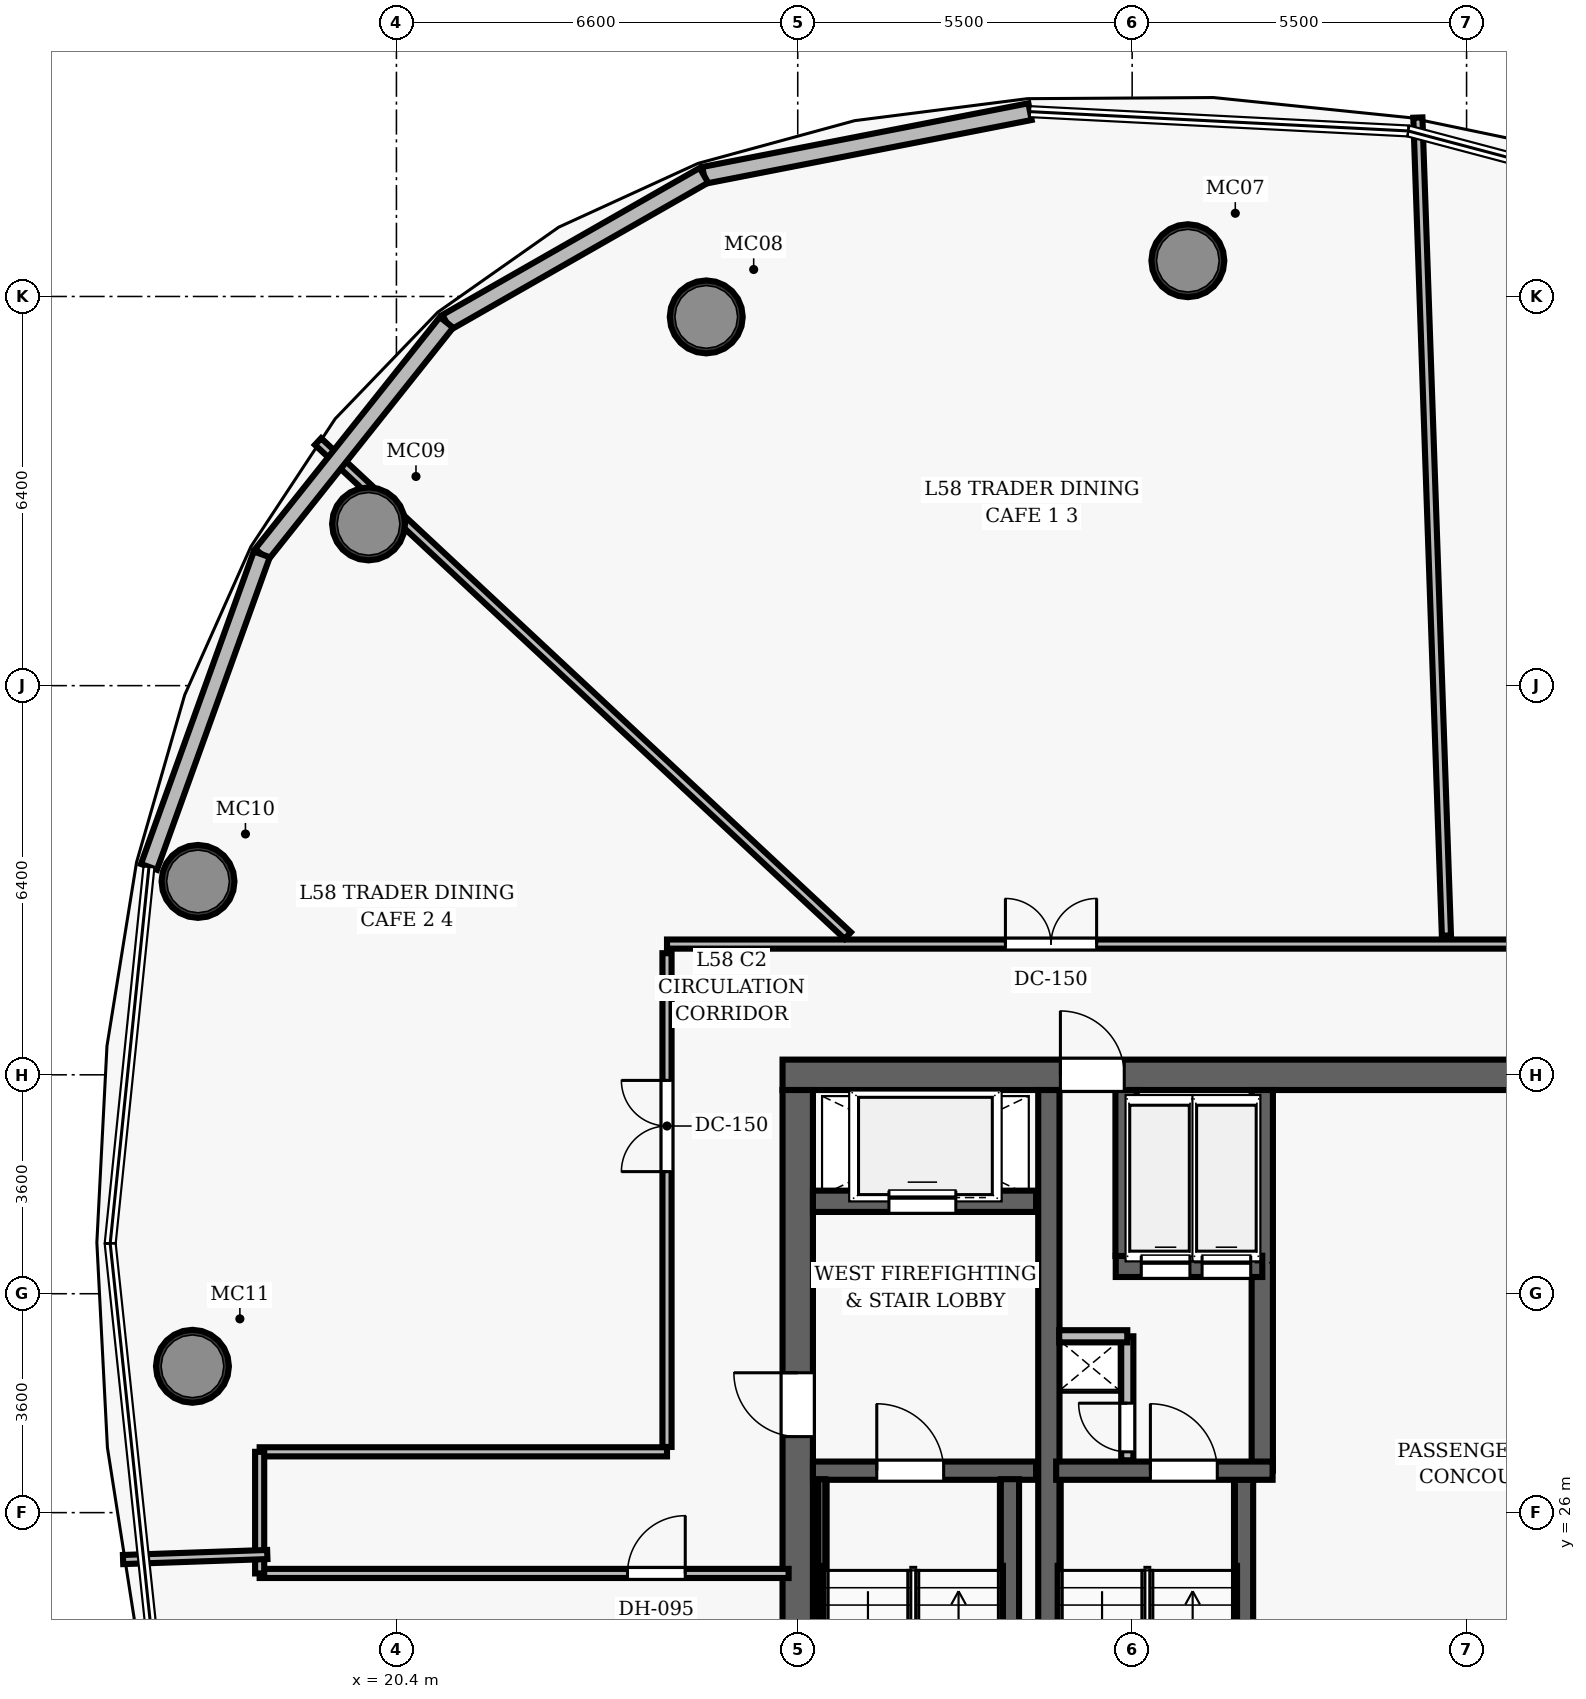
"""IFC4 building model, lengths in metres.
Left out: names, types, materials, properties, quantities, classifications, styles, units other than length and angle.
Written with IfcOpenShell. Run it as: python <this file> out.ifc"""

import sys

from ifc_helpers import new_model, si_unit, direction, frame, frame_2d, origin, origin_2d, place, context, subcontext, project, spatial, rectangle, hollow_circle, extrude, element, fill, save


model = new_model("IFC4")
c1 = context("Model", 3, precision=1e-05, world=origin(), true_north=direction((0.0, 1.0)))
c2 = subcontext(c1, "Body", "Model", "MODEL_VIEW")
j1 = project(units=[si_unit("LENGTHUNIT", "METRE"), si_unit("PLANEANGLEUNIT", "RADIAN")], contexts=[c1])
p1 = place(None, origin())
s1 = spatial("IfcSite", under=j1, at=p1, CompositionType="ELEMENT")
p2 = place(p1, origin())
s2 = spatial("IfcBuilding", under=s1, at=p2, CompositionType="ELEMENT")
p3 = place(p2, frame((0.0, 0.0, 228.95)))
s3 = spatial("IfcBuildingStorey", under=s2, at=p3, CompositionType="ELEMENT", Elevation=228.95)
p4 = place(p3, frame((26.75, 33.2, 0.0), z_axis=(0.0, 0.0, 1.0), x_axis=(1.0, 0.0, 0.0)))
e1 = element("IfcWall", 1, at=p4, inside=s3, PredefinedType="SHEAR", context=c2, shape_type="SweptSolid", body=[
    extrude(rectangle(XDim=22.5, YDim=0.5, at=frame_2d((11.25, 0.0))), origin(), (0.0, 0.0, 1.0), 3.85),
])
p5 = place(p4, frame((4.57, 0.0, 0.0)))
e2 = element("IfcOpeningElement", 2, at=p5, cuts=e1, PredefinedType="OPENING", context=c2, shape_type="SweptSolid", body=[
    extrude(rectangle(XDim=1.05, YDim=2.15, at=frame_2d((0.525, 1.075))), frame((0.0, 0.26, 0.0), z_axis=(0.0, -1.0, 0.0), x_axis=(1.0, 0.0, 0.0)), (0.0, 0.0, 1.0), 0.52),
])
p6 = place(p4, frame((14.47, 0.0, 0.0)))
e3 = element("IfcOpeningElement", 3, at=p6, cuts=e1, PredefinedType="OPENING", context=c2, shape_type="SweptSolid", body=[
    extrude(rectangle(XDim=1.05, YDim=2.15, at=frame_2d((0.525, 1.075))), frame((0.0, 0.26, 0.0), z_axis=(0.0, -1.0, 0.0), x_axis=(1.0, 0.0, 0.0)), (0.0, 0.0, 1.0), 0.52),
])
p7 = place(p3, frame((27.0, 19.05, 0.0), z_axis=(0.0, 0.0, 1.0), x_axis=(0.0, 1.0, 0.0)))
e4 = element("IfcWall", 4, at=p7, inside=s3, PredefinedType="SHEAR", context=c2, shape_type="SweptSolid", body=[
    extrude(rectangle(XDim=13.9, YDim=0.5, at=frame_2d((6.95, 0.0))), origin(), (0.0, 0.0, 1.0), 3.85),
])
p8 = place(p7, frame((8.2, 0.0, 0.0)))
e5 = element("IfcOpeningElement", 5, at=p8, cuts=e4, PredefinedType="OPENING", context=c2, shape_type="SweptSolid", body=[
    extrude(rectangle(XDim=1.05, YDim=2.15, at=frame_2d((0.525, 1.075))), frame((0.0, 0.26, 0.0), z_axis=(0.0, -1.0, 0.0), x_axis=(1.0, 0.0, 0.0)), (0.0, 0.0, 1.0), 0.52),
])
p9 = place(p3, frame((31.13, 19.05, 0.0), z_axis=(0.0, 0.0, 1.0), x_axis=(0.0, 1.0, 0.0)))
e6 = element("IfcWall", 6, at=p9, inside=s3, PredefinedType="SHEAR", context=c2, shape_type="SweptSolid", body=[
    extrude(rectangle(XDim=13.9, YDim=0.35, at=frame_2d((6.95, 0.0))), origin(), (0.0, 0.0, 1.0), 3.85),
])
for number, where, z_axis, x_axis in (
    (7, (33.416, 46.588, 0.0), (0.0, 0.0, 1.0), (1.0, 0.0, 0.0)),
    (8, (25.496, 45.664, 0.0), (0.0, 0.0, 1.0), (1.0, 0.0, 0.0)),
    (9, (19.942, 42.26, 0.0), (0.0, 0.0, 1.0), (1.0, 0.0, 0.0)),
    (10, (17.137, 36.381, 0.0), (0.0, 0.0, 1.0), (1.0, 0.0, 0.0)),
    (11, (17.045, 28.406, 0.0), (0.0, 0.0, 1.0), (1.0, 0.0, 0.0)),
):
    element("IfcColumn", number, at=place(p3, frame(where, z_axis=z_axis, x_axis=x_axis)), inside=s3, PredefinedType="COLUMN", context=c2, shape_type="SweptSolid", body=[
        extrude(hollow_circle(Radius=0.6, WallThickness=0.05, at=origin_2d()), origin(), (0.0, 0.0, 1.0), 3.85),
    ])
p10 = place(p3, frame((27.25, 26.69, 0.0), z_axis=(0.0, 0.0, 1.0), x_axis=(1.0, 0.0, 0.0)))
e12 = element("IfcWall", 12, at=p10, inside=s3, PredefinedType="SHEAR", context=c2, shape_type="SweptSolid", body=[
    extrude(rectangle(XDim=3.67, YDim=0.3, at=frame_2d((1.835, 0.0))), origin(), (0.0, 0.0, 1.0), 3.85),
])
p11 = place(p10, frame((1.05, 0.0, 0.0)))
e13 = element("IfcOpeningElement", 13, at=p11, cuts=e12, PredefinedType="OPENING", context=c2, shape_type="SweptSolid", body=[
    extrude(rectangle(XDim=1.1, YDim=2.15, at=frame_2d((0.55, 1.075))), frame((0.0, 0.16, 0.0), z_axis=(0.0, -1.0, 0.0), x_axis=(1.0, 0.0, 0.0)), (0.0, 0.0, 1.0), 0.32),
])
p12 = place(p3, frame((30.49, 19.05, 0.0), z_axis=(0.0, 0.0, 1.0), x_axis=(0.0, 1.0, 0.0)))
e14 = element("IfcWall", 14, at=p12, inside=s3, PredefinedType="SHEAR", context=c2, shape_type="SweptSolid", body=[
    extrude(rectangle(XDim=7.5, YDim=0.3, at=frame_2d((3.75, 0.0))), origin(), (0.0, 0.0, 1.0), 3.85),
])
p13 = place(p3, frame((27.395, 19.1, 0.0), z_axis=(0.0, 0.0, 1.0), x_axis=(0.0, 1.0, 0.0)))
e15 = element("IfcWall", 15, at=p13, inside=s3, PredefinedType="SHEAR", context=c2, shape_type="SweptSolid", body=[
    extrude(rectangle(XDim=7.45, YDim=0.12, at=frame_2d((3.725, 0.0))), origin(), (0.0, 0.0, 1.0), 3.85),
])
p14 = place(p3, frame((27.25, 31.12, 0.0), z_axis=(0.0, 0.0, 1.0), x_axis=(1.0, 0.0, 0.0)))
e16 = element("IfcWall", 16, at=p14, inside=s3, PredefinedType="SHEAR", context=c2, shape_type="SweptSolid", body=[
    extrude(rectangle(XDim=3.67, YDim=0.35, at=frame_2d((1.835, 0.0))), origin(), (0.0, 0.0, 1.0), 3.035),
])
p15 = place(p14, frame((1.25, 0.0, 0.0)))
e17 = element("IfcOpeningElement", 17, at=p15, cuts=e16, PredefinedType="OPENING", context=c2, shape_type="SweptSolid", body=[
    extrude(rectangle(XDim=1.1, YDim=2.15, at=frame_2d((0.55, 1.075))), frame((0.0, 0.185, 0.0), z_axis=(0.0, -1.0, 0.0), x_axis=(1.0, 0.0, 0.0)), (0.0, 0.0, 1.0), 0.37),
])
p16 = place(p3, frame((34.34, 19.05, 0.0), z_axis=(0.0, 0.0, 1.0), x_axis=(0.0, 1.0, 0.0)))
e18 = element("IfcWall", 18, at=p16, inside=s3, PredefinedType="SHEAR", context=c2, shape_type="SweptSolid", body=[
    extrude(rectangle(XDim=7.5, YDim=0.3, at=frame_2d((3.75, 0.0))), origin(), (0.0, 0.0, 1.0), 3.85),
])
p17 = place(p3, frame((34.64, 26.69, 0.0), z_axis=(0.0, 0.0, 1.0), x_axis=(0.0, 1.0, 0.0)))
e19 = element("IfcWall", 19, at=p17, inside=s3, PredefinedType="SHEAR", context=c2, shape_type="SweptSolid", body=[
    extrude(rectangle(XDim=6.26, YDim=0.35, at=frame_2d((3.13, 0.0))), origin(), (0.0, 0.0, 1.0), 3.85),
])
p18 = place(p3, frame((31.25, 26.69, 0.0), z_axis=(0.0, 0.0, 1.0), x_axis=(1.0, 0.0, 0.0)))
e20 = element("IfcWall", 20, at=p18, inside=s3, PredefinedType="SHEAR", context=c2, shape_type="SweptSolid", body=[
    extrude(rectangle(XDim=3.56, YDim=0.3, at=frame_2d((1.78, 0.0))), origin(), (0.0, 0.0, 1.0), 3.85),
])
p19 = place(p18, frame((1.55, 0.0, 0.0)))
e21 = element("IfcOpeningElement", 21, at=p19, cuts=e20, PredefinedType="OPENING", context=c2, shape_type="SweptSolid", body=[
    extrude(rectangle(XDim=1.1, YDim=2.15, at=frame_2d((0.55, 1.075))), frame((0.0, 0.16, 0.0), z_axis=(0.0, -1.0, 0.0), x_axis=(1.0, 0.0, 0.0)), (0.0, 0.0, 1.0), 0.32),
])
p20 = place(p3, frame((32.23, 30.05, 0.0), z_axis=(0.0, 0.0, 1.0), x_axis=(1.0, 0.0, 0.0)))
e22 = element("IfcWall", 22, at=p20, inside=s3, PredefinedType="SHEAR", context=c2, shape_type="SweptSolid", body=[
    extrude(rectangle(XDim=2.41, YDim=0.35, at=frame_2d((1.205, 0.0))), origin(), (0.0, 0.0, 1.0), 3.035),
])
p21 = place(p20, frame((0.42, 0.0, 0.0)))
e23 = element("IfcOpeningElement", 23, at=p21, cuts=e22, PredefinedType="OPENING", context=c2, shape_type="SweptSolid", body=[
    extrude(rectangle(XDim=0.8, YDim=2.15, at=frame_2d((0.4, 1.075))), frame((0.0, 0.185, 0.0), z_axis=(0.0, -1.0, 0.0), x_axis=(1.0, 0.0, 0.0)), (0.0, 0.0, 1.0), 0.37),
])
p22 = place(p20, frame((1.42, 0.0, 0.0)))
e24 = element("IfcOpeningElement", 24, at=p22, cuts=e22, PredefinedType="OPENING", context=c2, shape_type="SweptSolid", body=[
    extrude(rectangle(XDim=0.8, YDim=2.15, at=frame_2d((0.4, 1.075))), frame((0.0, 0.185, 0.0), z_axis=(0.0, -1.0, 0.0), x_axis=(1.0, 0.0, 0.0)), (0.0, 0.0, 1.0), 0.37),
])
p23 = place(p3, frame((32.4, 30.22, 0.0), z_axis=(0.0, 0.0, 1.0), x_axis=(0.0, 1.0, 0.0)))
e25 = element("IfcWall", 25, at=p23, inside=s3, PredefinedType="SHEAR", context=c2, shape_type="SweptSolid", body=[
    extrude(rectangle(XDim=2.73, YDim=0.35, at=frame_2d((1.365, 0.0))), origin(), (0.0, 0.0, 1.0), 3.035),
])
p24 = place(p3, frame((32.42, 26.86, 0.0), z_axis=(0.0, 0.0, 1.0), x_axis=(0.0, 1.0, 0.0)))
e26 = element("IfcWall", 26, at=p24, inside=s3, PredefinedType="PARTITIONING", context=c2, shape_type="SweptSolid", body=[
    extrude(rectangle(XDim=2.04, YDim=0.2, at=frame_2d((1.02, 0.0))), origin(), (0.0, 0.0, 1.0), 3.035),
])
p25 = place(p24, frame((0.14, 0.0, 0.0)))
e27 = element("IfcOpeningElement", 27, at=p25, cuts=e26, PredefinedType="OPENING", context=c2, shape_type="SweptSolid", body=[
    extrude(rectangle(XDim=0.8, YDim=2.05, at=frame_2d((0.4, 1.025))), frame((0.0, 0.11, 0.0), z_axis=(0.0, -1.0, 0.0), x_axis=(1.0, 0.0, 0.0)), (0.0, 0.0, 1.0), 0.22),
])
p26 = place(p3, frame((31.3, 28.9, 0.0), z_axis=(0.0, 0.0, 1.0), x_axis=(1.0, 0.0, 0.0)))
e28 = element("IfcWall", 28, at=p26, inside=s3, PredefinedType="PARTITIONING", context=c2, shape_type="SweptSolid", body=[
    extrude(rectangle(XDim=1.12, YDim=0.2, at=frame_2d((0.56, 0.0))), origin(), (0.0, 0.0, 1.0), 3.035),
])
p27 = place(p3, frame((24.85, 35.35, 0.0), z_axis=(0.0, 0.0, 1.0), x_axis=(1.0, 0.0, 0.0)))
e29 = element("IfcWall", 29, at=p27, inside=s3, PredefinedType="PARTITIONING", context=c2, shape_type="SweptSolid", body=[
    extrude(rectangle(XDim=26.0, YDim=0.15, at=frame_2d((13.0, 0.0))), origin(), (0.0, 0.0, 1.0), 3.035),
])
p28 = place(p27, frame((14.219, 0.0, 0.0)))
e30 = element("IfcOpeningElement", 30, at=p28, cuts=e29, PredefinedType="OPENING", context=c2, shape_type="SweptSolid", body=[
    extrude(rectangle(XDim=1.5, YDim=2.2, at=frame_2d((0.75, 1.1))), frame((0.0, 0.085, 0.0), z_axis=(0.0, -1.0, 0.0), x_axis=(1.0, 0.0, 0.0)), (0.0, 0.0, 1.0), 0.17),
])
p29 = place(p27, frame((5.566, 0.0, 0.0)))
e31 = element("IfcOpeningElement", 31, at=p29, cuts=e29, PredefinedType="OPENING", context=c2, shape_type="SweptSolid", body=[
    extrude(rectangle(XDim=1.5, YDim=2.2, at=frame_2d((0.75, 1.1))), frame((0.0, 0.085, 0.0), z_axis=(0.0, -1.0, 0.0), x_axis=(1.0, 0.0, 0.0)), (0.0, 0.0, 1.0), 0.17),
])
p30 = place(p3, frame((24.85, 27.08, 0.0), z_axis=(0.0, 0.0, 1.0), x_axis=(0.0, 1.0, 0.0)))
e32 = element("IfcWall", 32, at=p30, inside=s3, PredefinedType="PARTITIONING", context=c2, shape_type="SweptSolid", body=[
    extrude(rectangle(XDim=8.12, YDim=0.15, at=frame_2d((4.06, 0.0))), origin(), (0.0, 0.0, 1.0), 3.035),
])
p31 = place(p30, frame((4.528, 0.0, 0.0)))
e33 = element("IfcOpeningElement", 33, at=p31, cuts=e32, PredefinedType="OPENING", context=c2, shape_type="SweptSolid", body=[
    extrude(rectangle(XDim=1.5, YDim=2.2, at=frame_2d((0.75, 1.1))), frame((0.0, 0.085, 0.0), z_axis=(0.0, -1.0, 0.0), x_axis=(1.0, 0.0, 0.0)), (0.0, 0.0, 1.0), 0.17),
])
p32 = place(p3, frame((18.151, 27.0, 0.0), z_axis=(0.0, 0.0, 1.0), x_axis=(1.0, 0.0, 0.0)))
e34 = element("IfcWall", 34, at=p32, inside=s3, PredefinedType="PARTITIONING", context=c2, shape_type="SweptSolid", body=[
    extrude(rectangle(XDim=6.699, YDim=0.15, at=frame_2d((3.35, 0.0))), origin(), (0.0, 0.0, 1.0), 3.035),
])
p33 = place(p3, frame((18.151, 25.0, 0.0), z_axis=(0.0, 0.0, 1.0), x_axis=(1.0, 0.0, 0.0)))
e35 = element("IfcWall", 35, at=p33, inside=s3, PredefinedType="PARTITIONING", context=c2, shape_type="SweptSolid", body=[
    extrude(rectangle(XDim=8.699, YDim=0.15, at=frame_2d((4.35, 0.0))), origin(), (0.0, 0.0, 1.0), 3.035),
])
p34 = place(p33, frame((6.05, 0.0, 0.0)))
e36 = element("IfcOpeningElement", 36, at=p34, cuts=e35, PredefinedType="OPENING", context=c2, shape_type="SweptSolid", body=[
    extrude(rectangle(XDim=0.95, YDim=2.15, at=frame_2d((0.475, 1.075))), frame((0.0, 0.085, 0.0), z_axis=(0.0, -1.0, 0.0), x_axis=(1.0, 0.0, 0.0)), (0.0, 0.0, 1.0), 0.17),
])
p35 = place(p3, frame((18.151, 25.0, 0.0), z_axis=(0.0, 0.0, 1.0), x_axis=(0.0, 1.0, 0.0)))
e37 = element("IfcWall", 37, at=p35, inside=s3, PredefinedType="PARTITIONING", context=c2, shape_type="SweptSolid", body=[
    extrude(rectangle(XDim=2.0, YDim=0.15, at=frame_2d((1.0, 0.0))), origin(), (0.0, 0.0, 1.0), 3.035),
])
p36 = place(p3, frame((37.669, 35.49, 0.0), z_axis=(0.0, 0.0, 1.0), x_axis=(-0.034915177635, 0.999390279306, 0.0)))
e38 = element("IfcWall", 38, at=p36, inside=s3, PredefinedType="PARTITIONING", context=c2, shape_type="SweptSolid", body=[
    extrude(rectangle(XDim=13.46, YDim=0.15, at=frame_2d((6.73, 0.0))), origin(), (0.0, 0.0, 1.0), 3.035),
])
p37 = place(p3, frame((27.823, 35.49, 0.0), z_axis=(0.0, 0.0, 1.0), x_axis=(-0.731350976041, 0.682001282875, 0.0)))
e39 = element("IfcWall", 39, at=p37, inside=s3, PredefinedType="PARTITIONING", context=c2, shape_type="SweptSolid", body=[
    extrude(rectangle(XDim=11.913, YDim=0.15, at=frame_2d((5.957, 0.0))), origin(), (0.0, 0.0, 1.0), 3.035),
])
p38 = place(p3, frame((18.276, 25.311, 0.0), z_axis=(0.0, 0.0, 1.0), x_axis=(-0.999391742593, -0.034873268218, 0.0)))
e40 = element("IfcWall", 40, at=p38, inside=s3, PredefinedType="PARTITIONING", context=c2, shape_type="SweptSolid", body=[
    extrude(rectangle(XDim=2.373, YDim=0.15, at=frame_2d((1.187, 0.0))), origin(), (0.0, 0.0, 1.0), 3.035),
])
p39 = place(p3, frame((25.457, 47.992, 0.0), z_axis=(0.0, 0.0, 1.0), x_axis=(0.981469079326, 0.19162057908, 0.0)))
e41 = element("IfcWall", 41, at=p39, inside=s3, PredefinedType="SOLIDWALL", context=c2, shape_type="SweptSolid", body=[
    extrude(rectangle(XDim=5.465, YDim=0.28, at=frame_2d((2.732, 0.0))), origin(), (0.0, 0.0, 1.0), 3.62),
])
p40 = place(p3, frame((21.223, 45.574, 0.0), z_axis=(0.0, 0.0, 1.0), x_axis=(0.868347876631, 0.495955608044, 0.0)))
e42 = element("IfcWall", 42, at=p40, inside=s3, PredefinedType="SOLIDWALL", context=c2, shape_type="SweptSolid", body=[
    extrude(rectangle(XDim=4.876, YDim=0.28, at=frame_2d((2.438, 0.0))), origin(), (0.0, 0.0, 1.0), 3.62),
])
p41 = place(p3, frame((18.185, 41.76, 0.0), z_axis=(0.0, 0.0, 1.0), x_axis=(0.622947208078, 0.782263878718, 0.0)))
e43 = element("IfcWall", 43, at=p41, inside=s3, PredefinedType="SOLIDWALL", context=c2, shape_type="SweptSolid", body=[
    extrude(rectangle(XDim=4.876, YDim=0.28, at=frame_2d((2.438, 0.0))), origin(), (0.0, 0.0, 1.0), 3.62),
])
p42 = place(p3, frame((16.33, 36.62, 0.0), z_axis=(0.0, 0.0, 1.0), x_axis=(0.339507224347, 0.940603447057, 0.0)))
e44 = element("IfcWall", 44, at=p42, inside=s3, PredefinedType="SOLIDWALL", context=c2, shape_type="SweptSolid", body=[
    extrude(rectangle(XDim=5.464, YDim=0.28, at=frame_2d((2.732, 0.0))), origin(), (0.0, 0.0, 1.0), 3.62),
])
p43 = place(p11, origin())
e45 = element("IfcDoor", 45, at=p43, inside=s3, OperationType="SINGLE_SWING_LEFT", PredefinedType="DOOR", context=c2, shape_type="SweptSolid", body=[
    extrude(rectangle(XDim=1.1, YDim=2.15, at=frame_2d((0.55, 1.075))), frame((0.0, 0.025, 0.0), z_axis=(0.0, -1.0, 0.0), x_axis=(1.0, 0.0, 0.0)), (0.0, 0.0, 1.0), 0.05),
])
fill(e13, e45)
p44 = place(p8, origin())
e46 = element("IfcDoor", 46, at=p44, inside=s3, OperationType="SINGLE_SWING_RIGHT", PredefinedType="DOOR", context=c2, shape_type="SweptSolid", body=[
    extrude(rectangle(XDim=1.05, YDim=2.15, at=frame_2d((0.525, 1.075))), frame((0.0, 0.025, 0.0), z_axis=(0.0, -1.0, 0.0), x_axis=(1.0, 0.0, 0.0)), (0.0, 0.0, 1.0), 0.05),
])
fill(e5, e46)
p45 = place(p19, origin())
e47 = element("IfcDoor", 47, at=p45, inside=s3, OperationType="SINGLE_SWING_LEFT", PredefinedType="DOOR", context=c2, shape_type="SweptSolid", body=[
    extrude(rectangle(XDim=1.1, YDim=2.15, at=frame_2d((0.55, 1.075))), frame((0.0, 0.025, 0.0), z_axis=(0.0, -1.0, 0.0), x_axis=(1.0, 0.0, 0.0)), (0.0, 0.0, 1.0), 0.05),
])
fill(e21, e47)
p46 = place(p25, origin())
e48 = element("IfcDoor", 48, at=p46, inside=s3, OperationType="SINGLE_SWING_RIGHT", PredefinedType="DOOR", context=c2, shape_type="SweptSolid", body=[
    extrude(rectangle(XDim=0.8, YDim=2.05, at=frame_2d((0.4, 1.025))), frame((0.0, 0.025, 0.0), z_axis=(0.0, -1.0, 0.0), x_axis=(1.0, 0.0, 0.0)), (0.0, 0.0, 1.0), 0.05),
])
fill(e27, e48)
p47 = place(p5, origin())
e49 = element("IfcDoor", 49, at=p47, inside=s3, OperationType="SINGLE_SWING_LEFT", PredefinedType="DOOR", context=c2, shape_type="SweptSolid", body=[
    extrude(rectangle(XDim=1.05, YDim=2.15, at=frame_2d((0.525, 1.075))), frame((0.0, 0.025, 0.0), z_axis=(0.0, -1.0, 0.0), x_axis=(1.0, 0.0, 0.0)), (0.0, 0.0, 1.0), 0.05),
])
fill(e2, e49)
p48 = place(p29, origin())
e50 = element("IfcDoor", 50, at=p48, inside=s3, OperationType="DOUBLE_DOOR_SINGLE_SWING", PredefinedType="DOOR", context=c2, shape_type="SweptSolid", body=[
    extrude(rectangle(XDim=1.5, YDim=2.2, at=frame_2d((0.75, 1.1))), frame((0.0, 0.025, 0.0), z_axis=(0.0, -1.0, 0.0), x_axis=(1.0, 0.0, 0.0)), (0.0, 0.0, 1.0), 0.05),
])
fill(e31, e50)
p49 = place(p31, origin())
e51 = element("IfcDoor", 51, at=p49, inside=s3, OperationType="DOUBLE_DOOR_SINGLE_SWING", PredefinedType="DOOR", context=c2, shape_type="SweptSolid", body=[
    extrude(rectangle(XDim=1.5, YDim=2.2, at=frame_2d((0.75, 1.1))), frame((0.0, 0.025, 0.0), z_axis=(0.0, -1.0, 0.0), x_axis=(1.0, 0.0, 0.0)), (0.0, 0.0, 1.0), 0.05),
])
fill(e33, e51)
p50 = place(p34, origin())
e52 = element("IfcDoor", 52, at=p50, inside=s3, OperationType="SINGLE_SWING_RIGHT", PredefinedType="DOOR", context=c2, shape_type="SweptSolid", body=[
    extrude(rectangle(XDim=0.95, YDim=2.15, at=frame_2d((0.475, 1.075))), frame((0.0, 0.025, 0.0), z_axis=(0.0, -1.0, 0.0), x_axis=(1.0, 0.0, 0.0)), (0.0, 0.0, 1.0), 0.05),
])
fill(e36, e52)
p51 = place(p15, origin())
e53 = element("IfcDoor", 53, at=p51, inside=s3, OperationType="SLIDING_TO_LEFT", PredefinedType="DOOR", context=c2, shape_type="SweptSolid", body=[
    extrude(rectangle(XDim=1.1, YDim=2.15, at=frame_2d((0.55, 1.075))), frame((0.0, 0.025, 0.0), z_axis=(0.0, -1.0, 0.0), x_axis=(1.0, 0.0, 0.0)), (0.0, 0.0, 1.0), 0.05),
])
fill(e17, e53)
p52 = place(p21, origin())
e54 = element("IfcDoor", 54, at=p52, inside=s3, OperationType="SLIDING_TO_LEFT", PredefinedType="DOOR", context=c2, shape_type="SweptSolid", body=[
    extrude(rectangle(XDim=0.8, YDim=2.15, at=frame_2d((0.4, 1.075))), frame((0.0, 0.025, 0.0), z_axis=(0.0, -1.0, 0.0), x_axis=(1.0, 0.0, 0.0)), (0.0, 0.0, 1.0), 0.05),
])
fill(e23, e54)
p53 = place(p22, origin())
e55 = element("IfcDoor", 55, at=p53, inside=s3, OperationType="SLIDING_TO_LEFT", PredefinedType="DOOR", context=c2, shape_type="SweptSolid", body=[
    extrude(rectangle(XDim=0.8, YDim=2.15, at=frame_2d((0.4, 1.075))), frame((0.0, 0.025, 0.0), z_axis=(0.0, -1.0, 0.0), x_axis=(1.0, 0.0, 0.0)), (0.0, 0.0, 1.0), 0.05),
])
fill(e24, e55)
save(model, sys.argv[1])
